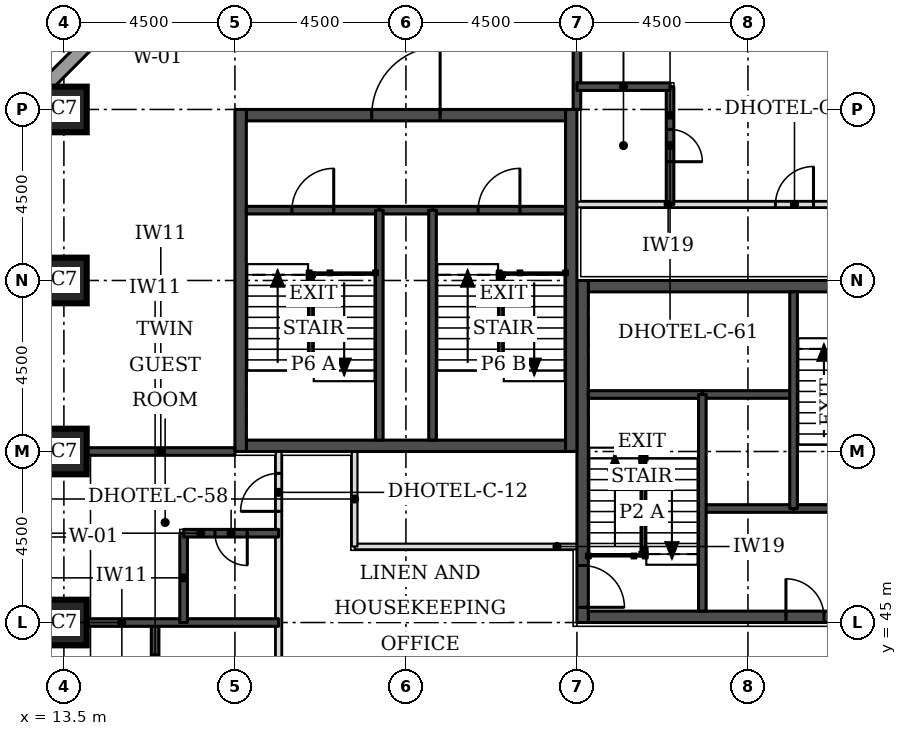
"""IFC4 building model, lengths in metres.
Left out: names, types, materials, properties, quantities, classifications, styles, units other than length and angle.
Written with IfcOpenShell. Run it as: python <this file> out.ifc"""

import sys

from ifc_helpers import new_model, si_unit, direction, frame, frame_2d, origin, origin_2d, place, context, subcontext, project, spatial, rectangle, extrude, element, fill, save


model = new_model("IFC4")
c1 = context("Model", 3, precision=1e-05, world=origin(), true_north=direction((0.0, 1.0)))
c2 = subcontext(c1, "Body", "Model", "MODEL_VIEW")
j1 = project(units=[si_unit("LENGTHUNIT", "METRE"), si_unit("PLANEANGLEUNIT", "RADIAN")], contexts=[c1])
p1 = place(None, origin())
s1 = spatial("IfcSite", under=j1, at=p1, CompositionType="ELEMENT")
p2 = place(p1, origin())
s2 = spatial("IfcBuilding", under=s1, at=p2, CompositionType="ELEMENT")
p3 = place(p2, frame((0.0, 0.0, 33.0)))
s3 = spatial("IfcBuildingStorey", under=s2, at=p3, CompositionType="ELEMENT", Elevation=33.0)
for number, where, z_axis, x_axis in (
    (1, (13.5, 45.0, 0.0), (0.0, 0.0, 1.0), (1.0, 0.0, 0.0)),
    (2, (13.5, 49.5, 0.0), (0.0, 0.0, 1.0), (1.0, 0.0, 0.0)),
    (3, (13.5, 54.0, 0.0), (0.0, 0.0, 1.0), (1.0, 0.0, 0.0)),
    (4, (13.5, 58.5, 0.0), (0.0, 0.0, 1.0), (1.0, 0.0, 0.0)),
):
    element("IfcColumn", number, at=place(p3, frame(where, z_axis=z_axis, x_axis=x_axis)), inside=s3, PredefinedType="COLUMN", context=c2, shape_type="SweptSolid", body=[
        extrude(rectangle(XDim=1.2, YDim=1.2, at=origin_2d()), origin(), (0.0, 0.0, 1.0), 3.3),
    ])
p4 = place(p3, frame((27.3, 45.15, 0.0), z_axis=(0.0, 0.0, 1.0), x_axis=(1.0, 0.0, 0.0)))
e5 = element("IfcWall", 5, at=p4, inside=s3, PredefinedType="SHEAR", context=c2, shape_type="SweptSolid", body=[
    extrude(rectangle(XDim=8.4, YDim=0.3, at=frame_2d((4.2, 0.0))), origin(), (0.0, 0.0, 1.0), 3.3),
])
p5 = place(p4, frame((5.2, 0.0, 0.0)))
e6 = element("IfcOpeningElement", 6, at=p5, cuts=e5, PredefinedType="OPENING", context=c2, shape_type="SweptSolid", body=[
    extrude(rectangle(XDim=1.0, YDim=2.1, at=frame_2d((0.5, 1.05))), frame((0.0, 0.16, 0.0), z_axis=(0.0, -1.0, 0.0), x_axis=(1.0, 0.0, 0.0)), (0.0, 0.0, 1.0), 0.32),
])
p6 = place(p3, frame((27.3, 53.85, 0.0), z_axis=(0.0, 0.0, 1.0), x_axis=(1.0, 0.0, 0.0)))
e7 = element("IfcWall", 7, at=p6, inside=s3, PredefinedType="SHEAR", context=c2, shape_type="SweptSolid", body=[
    extrude(rectangle(XDim=8.4, YDim=0.3, at=frame_2d((4.2, 0.0))), origin(), (0.0, 0.0, 1.0), 3.3),
])
p7 = place(p6, frame((6.4, 0.0, 0.0)))
e8 = element("IfcOpeningElement", 8, at=p7, cuts=e7, PredefinedType="OPENING", context=c2, shape_type="SweptSolid", body=[
    extrude(rectangle(XDim=1.1, YDim=2.1, at=frame_2d((0.55, 1.05))), frame((0.0, 0.16, 0.0), z_axis=(0.0, -1.0, 0.0), x_axis=(1.0, 0.0, 0.0)), (0.0, 0.0, 1.0), 0.32),
])
p8 = place(p3, frame((27.15, 45.0, 0.0), z_axis=(0.0, 0.0, 1.0), x_axis=(0.0, 1.0, 0.0)))
e9 = element("IfcWall", 9, at=p8, inside=s3, PredefinedType="SHEAR", context=c2, shape_type="SweptSolid", body=[
    extrude(rectangle(XDim=9.0, YDim=0.3, at=frame_2d((4.5, 0.0))), origin(), (0.0, 0.0, 1.0), 3.3),
])
p9 = place(p8, frame((0.4, 0.0, 0.0)))
e10 = element("IfcOpeningElement", 10, at=p9, cuts=e9, PredefinedType="OPENING", context=c2, shape_type="SweptSolid", body=[
    extrude(rectangle(XDim=1.1, YDim=2.1, at=frame_2d((0.55, 1.05))), frame((0.0, 0.16, 0.0), z_axis=(0.0, -1.0, 0.0), x_axis=(1.0, 0.0, 0.0)), (0.0, 0.0, 1.0), 0.32),
])
p10 = place(p3, frame((18.3, 49.65, 0.0), z_axis=(0.0, 0.0, 1.0), x_axis=(1.0, 0.0, 0.0)))
e11 = element("IfcWall", 11, at=p10, inside=s3, PredefinedType="SHEAR", context=c2, shape_type="SweptSolid", body=[
    extrude(rectangle(XDim=8.4, YDim=0.3, at=frame_2d((4.2, 0.0))), origin(), (0.0, 0.0, 1.0), 3.3),
])
p11 = place(p3, frame((18.3, 58.35, 0.0), z_axis=(0.0, 0.0, 1.0), x_axis=(1.0, 0.0, 0.0)))
e12 = element("IfcWall", 12, at=p11, inside=s3, PredefinedType="SHEAR", context=c2, shape_type="SweptSolid", body=[
    extrude(rectangle(XDim=8.4, YDim=0.3, at=frame_2d((4.2, 0.0))), origin(), (0.0, 0.0, 1.0), 3.3),
])
p12 = place(p11, frame((3.3, 0.0, 0.0)))
e13 = element("IfcOpeningElement", 13, at=p12, cuts=e12, PredefinedType="OPENING", context=c2, shape_type="SweptSolid", body=[
    extrude(rectangle(XDim=1.8, YDim=2.1, at=frame_2d((0.9, 1.05))), frame((0.0, 0.16, 0.0), z_axis=(0.0, -1.0, 0.0), x_axis=(1.0, 0.0, 0.0)), (0.0, 0.0, 1.0), 0.32),
])
for number, where, z_axis, x_axis in (
    (14, (18.15, 49.5, 0.0), (0.0, 0.0, 1.0), (0.0, 1.0, 0.0)),
    (15, (26.85, 49.5, 0.0), (0.0, 0.0, 1.0), (0.0, 1.0, 0.0)),
):
    element("IfcWall", number, at=place(p3, frame(where, z_axis=z_axis, x_axis=x_axis)), inside=s3, PredefinedType="SHEAR", context=c2, shape_type="SweptSolid", body=[
        extrude(rectangle(XDim=9.0, YDim=0.3, at=frame_2d((4.5, 0.0))), origin(), (0.0, 0.0, 1.0), 3.3),
    ])
p13 = place(p3, frame((17.73, 63.826, 0.0), z_axis=(0.0, 0.0, 1.0), x_axis=(-0.707106781187, -0.707106781187, 0.0)))
e16 = element("IfcWall", 16, at=p13, inside=s3, PredefinedType="STANDARD", context=c2, shape_type="SweptSolid", body=[
    extrude(rectangle(XDim=7.151, YDim=0.35, at=frame_2d((3.576, 0.0))), origin(), (0.0, 0.0, 1.0), 3.055),
])
p14 = place(p13, frame((1.926, 0.0, 0.8)))
e17 = element("IfcOpeningElement", 17, at=p14, cuts=e16, PredefinedType="OPENING", context=c2, shape_type="SweptSolid", body=[
    extrude(rectangle(XDim=3.3, YDim=1.5, at=frame_2d((1.65, 0.75))), frame((0.0, 0.185, 0.0), z_axis=(0.0, -1.0, 0.0), x_axis=(1.0, 0.0, 0.0)), (0.0, 0.0, 1.0), 0.37),
])
p15 = place(p3, frame((19.15, 25.15, 0.0), z_axis=(0.0, 0.0, 1.0), x_axis=(0.0, 1.0, 0.0)))
e18 = element("IfcWall", 18, at=p15, inside=s3, PredefinedType="PARTITIONING", context=c2, shape_type="SweptSolid", body=[
    extrude(rectangle(XDim=24.35, YDim=0.15, at=frame_2d((12.175, 0.0))), origin(), (0.0, 0.0, 1.0), 3.08),
])
p16 = place(p15, frame((0.347, 0.0, 0.0)))
e19 = element("IfcOpeningElement", 19, at=p16, cuts=e18, PredefinedType="OPENING", context=c2, shape_type="SweptSolid", body=[
    extrude(rectangle(XDim=1.0, YDim=2.1, at=frame_2d((0.5, 1.05))), frame((0.0, 0.085, 0.0), z_axis=(0.0, -1.0, 0.0), x_axis=(1.0, 0.0, 0.0)), (0.0, 0.0, 1.0), 0.17),
])
p17 = place(p15, frame((4.775, 0.0, 0.0)))
e20 = element("IfcOpeningElement", 20, at=p17, cuts=e18, PredefinedType="OPENING", context=c2, shape_type="SweptSolid", body=[
    extrude(rectangle(XDim=1.0, YDim=2.1, at=frame_2d((0.5, 1.05))), frame((0.0, 0.085, 0.0), z_axis=(0.0, -1.0, 0.0), x_axis=(1.0, 0.0, 0.0)), (0.0, 0.0, 1.0), 0.17),
])
p18 = place(p15, frame((7.175, 0.0, 0.0)))
e21 = element("IfcOpeningElement", 21, at=p18, cuts=e18, PredefinedType="OPENING", context=c2, shape_type="SweptSolid", body=[
    extrude(rectangle(XDim=1.0, YDim=2.1, at=frame_2d((0.5, 1.05))), frame((0.0, 0.085, 0.0), z_axis=(0.0, -1.0, 0.0), x_axis=(1.0, 0.0, 0.0)), (0.0, 0.0, 1.0), 0.17),
])
p19 = place(p15, frame((13.75, 0.0, 0.0)))
e22 = element("IfcOpeningElement", 22, at=p19, cuts=e18, PredefinedType="OPENING", context=c2, shape_type="SweptSolid", body=[
    extrude(rectangle(XDim=1.0, YDim=2.1, at=frame_2d((0.5, 1.05))), frame((0.0, 0.085, 0.0), z_axis=(0.0, -1.0, 0.0), x_axis=(1.0, 0.0, 0.0)), (0.0, 0.0, 1.0), 0.17),
])
p20 = place(p15, frame((16.175, 0.0, 0.0)))
e23 = element("IfcOpeningElement", 23, at=p20, cuts=e18, PredefinedType="OPENING", context=c2, shape_type="SweptSolid", body=[
    extrude(rectangle(XDim=1.0, YDim=2.1, at=frame_2d((0.5, 1.05))), frame((0.0, 0.085, 0.0), z_axis=(0.0, -1.0, 0.0), x_axis=(1.0, 0.0, 0.0)), (0.0, 0.0, 1.0), 0.17),
])
p21 = place(p15, frame((22.775, 0.0, 0.0)))
e24 = element("IfcOpeningElement", 24, at=p21, cuts=e18, PredefinedType="OPENING", context=c2, shape_type="SweptSolid", body=[
    extrude(rectangle(XDim=1.0, YDim=2.1, at=frame_2d((0.5, 1.05))), frame((0.0, 0.085, 0.0), z_axis=(0.0, -1.0, 0.0), x_axis=(1.0, 0.0, 0.0)), (0.0, 0.0, 1.0), 0.17),
])
p22 = place(p3, frame((21.15, 47.0, 0.0), z_axis=(0.0, 0.0, 1.0), x_axis=(1.0, 0.0, 0.0)))
e25 = element("IfcWall", 25, at=p22, inside=s3, PredefinedType="PARTITIONING", context=c2, shape_type="SweptSolid", body=[
    extrude(rectangle(XDim=5.85, YDim=0.15, at=frame_2d((2.925, 0.0))), origin(), (0.0, 0.0, 1.0), 3.08),
])
p23 = place(p3, frame((21.15, 47.0, 0.0), z_axis=(0.0, 0.0, 1.0), x_axis=(0.0, 1.0, 0.0)))
e26 = element("IfcWall", 26, at=p23, inside=s3, PredefinedType="PARTITIONING", context=c2, shape_type="SweptSolid", body=[
    extrude(rectangle(XDim=2.5, YDim=0.15, at=frame_2d((1.25, 0.0))), origin(), (0.0, 0.0, 1.0), 3.08),
])
p24 = place(p3, frame((27.0, 56.0, 0.0), z_axis=(0.0, 0.0, 1.0), x_axis=(1.0, 0.0, 0.0)))
e27 = element("IfcWall", 27, at=p24, inside=s3, PredefinedType="PARTITIONING", context=c2, shape_type="SweptSolid", body=[
    extrude(rectangle(XDim=16.0, YDim=0.15, at=frame_2d((8.0, 0.0))), origin(), (0.0, 0.0, 1.0), 3.08),
])
p25 = place(p24, frame((5.225, 0.0, 0.0)))
e28 = element("IfcOpeningElement", 28, at=p25, cuts=e27, PredefinedType="OPENING", context=c2, shape_type="SweptSolid", body=[
    extrude(rectangle(XDim=1.0, YDim=2.1, at=frame_2d((0.5, 1.05))), frame((0.0, 0.085, 0.0), z_axis=(0.0, -1.0, 0.0), x_axis=(1.0, 0.0, 0.0)), (0.0, 0.0, 1.0), 0.17),
])
p26 = place(p3, frame((15.9, 43.15, 0.0), z_axis=(0.0, 0.0, 1.0), x_axis=(0.0, 1.0, 0.0)))
e29 = element("IfcWall", 29, at=p26, inside=s3, PredefinedType="SOLIDWALL", context=c2, shape_type="SweptSolid", body=[
    extrude(rectangle(XDim=1.85, YDim=0.2, at=frame_2d((0.925, 0.0))), origin(), (0.0, 0.0, 1.0), 3.08),
])
p27 = place(p3, frame((14.1, 45.0, 0.0), z_axis=(0.0, 0.0, 1.0), x_axis=(1.0, 0.0, 0.0)))
e30 = element("IfcWall", 30, at=p27, inside=s3, PredefinedType="SOLIDWALL", context=c2, shape_type="SweptSolid", body=[
    extrude(rectangle(XDim=5.05, YDim=0.2, at=frame_2d((2.525, 0.0))), origin(), (0.0, 0.0, 1.0), 3.08),
])
p28 = place(p3, frame((16.65, 45.0, 0.0), z_axis=(0.0, 0.0, 1.0), x_axis=(0.0, 1.0, 0.0)))
e31 = element("IfcWall", 31, at=p28, inside=s3, PredefinedType="SOLIDWALL", context=c2, shape_type="SweptSolid", body=[
    extrude(rectangle(XDim=2.35, YDim=0.2, at=frame_2d((1.175, 0.0))), origin(), (0.0, 0.0, 1.0), 3.08),
])
p29 = place(p3, frame((16.65, 47.35, 0.0), z_axis=(0.0, 0.0, 1.0), x_axis=(1.0, 0.0, 0.0)))
e32 = element("IfcWall", 32, at=p29, inside=s3, PredefinedType="SOLIDWALL", context=c2, shape_type="SweptSolid", body=[
    extrude(rectangle(XDim=2.5, YDim=0.2, at=frame_2d((1.25, 0.0))), origin(), (0.0, 0.0, 1.0), 3.08),
])
p30 = place(p29, frame((0.825, 0.0, 0.0)))
e33 = element("IfcOpeningElement", 33, at=p30, cuts=e32, PredefinedType="OPENING", context=c2, shape_type="SweptSolid", body=[
    extrude(rectangle(XDim=0.85, YDim=2.1, at=frame_2d((0.425, 1.05))), frame((0.0, 0.11, 0.0), z_axis=(0.0, -1.0, 0.0), x_axis=(1.0, 0.0, 0.0)), (0.0, 0.0, 1.0), 0.22),
])
for number, where, z_axis, x_axis in (
    (34, (14.1, 49.5, 0.0), (0.0, 0.0, 1.0), (1.0, 0.0, 0.0)),
    (35, (27.0, 58.5, 0.0), (0.0, 0.0, 1.0), (0.0, 1.0, 0.0)),
):
    element("IfcWall", number, at=place(p3, frame(where, z_axis=z_axis, x_axis=x_axis)), inside=s3, PredefinedType="SOLIDWALL", context=c2, shape_type="SweptSolid", body=[
        extrude(rectangle(XDim=3.9, YDim=0.2, at=frame_2d((1.95, 0.0))), origin(), (0.0, 0.0, 1.0), 3.08),
    ])
p31 = place(p3, frame((29.45, 56.0, 0.0), z_axis=(0.0, 0.0, 1.0), x_axis=(0.0, 1.0, 0.0)))
e36 = element("IfcWall", 36, at=p31, inside=s3, PredefinedType="SOLIDWALL", context=c2, shape_type="SweptSolid", body=[
    extrude(rectangle(XDim=3.1, YDim=0.2, at=frame_2d((1.55, 0.0))), origin(), (0.0, 0.0, 1.0), 3.08),
])
p32 = place(p31, frame((1.125, 0.0, 0.0)))
e37 = element("IfcOpeningElement", 37, at=p32, cuts=e36, PredefinedType="OPENING", context=c2, shape_type="SweptSolid", body=[
    extrude(rectangle(XDim=0.85, YDim=2.1, at=frame_2d((0.425, 1.05))), frame((0.0, 0.11, 0.0), z_axis=(0.0, -1.0, 0.0), x_axis=(1.0, 0.0, 0.0)), (0.0, 0.0, 1.0), 0.22),
])
p33 = place(p3, frame((27.0, 59.1, 0.0), z_axis=(0.0, 0.0, 1.0), x_axis=(1.0, 0.0, 0.0)))
e38 = element("IfcWall", 38, at=p33, inside=s3, PredefinedType="SOLIDWALL", context=c2, shape_type="SweptSolid", body=[
    extrude(rectangle(XDim=2.45, YDim=0.2, at=frame_2d((1.225, 0.0))), origin(), (0.0, 0.0, 1.0), 3.08),
])
p34 = place(p3, frame((30.3, 48.0, 0.0), z_axis=(0.0, 0.0, 1.0), x_axis=(1.0, 0.0, 0.0)))
e39 = element("IfcWall", 39, at=p34, inside=s3, PredefinedType="SOLIDWALL", context=c2, shape_type="SweptSolid", body=[
    extrude(rectangle(XDim=2.4, YDim=0.2, at=frame_2d((1.2, 0.0))), origin(), (0.0, 0.0, 1.0), 3.08),
])
p35 = place(p3, frame((32.7, 48.0, 0.0), z_axis=(0.0, 0.0, 1.0), x_axis=(1.0, 0.0, 0.0)))
e40 = element("IfcWall", 40, at=p35, inside=s3, PredefinedType="SOLIDWALL", context=c2, shape_type="SweptSolid", body=[
    extrude(rectangle(XDim=3.0, YDim=0.2, at=frame_2d((1.5, 0.0))), origin(), (0.0, 0.0, 1.0), 3.08),
])
p36 = place(p3, frame((30.3, 51.0, 0.0), z_axis=(0.0, 0.0, 1.0), x_axis=(1.0, 0.0, 0.0)))
e41 = element("IfcWall", 41, at=p36, inside=s3, PredefinedType="SOLIDWALL", context=c2, shape_type="SweptSolid", body=[
    extrude(rectangle(XDim=2.4, YDim=0.2, at=frame_2d((1.2, 0.0))), origin(), (0.0, 0.0, 1.0), 3.3),
])
p37 = place(p3, frame((27.3, 51.0, 0.0), z_axis=(0.0, 0.0, 1.0), x_axis=(1.0, 0.0, 0.0)))
e42 = element("IfcWall", 42, at=p37, inside=s3, PredefinedType="SOLIDWALL", context=c2, shape_type="SweptSolid", body=[
    extrude(rectangle(XDim=3.0, YDim=0.2, at=frame_2d((1.5, 0.0))), origin(), (0.0, 0.0, 1.0), 3.08),
])
for number, where, z_axis, x_axis in (
    (43, (30.3, 45.3, 0.0), (0.0, 0.0, 1.0), (0.0, 1.0, 0.0)),
    (44, (32.7, 48.0, 0.0), (0.0, 0.0, 1.0), (0.0, 1.0, 0.0)),
):
    element("IfcWall", number, at=place(p3, frame(where, z_axis=z_axis, x_axis=x_axis)), inside=s3, PredefinedType="SOLIDWALL", context=c2, shape_type="SweptSolid", body=[
        extrude(rectangle(XDim=5.7, YDim=0.2, at=frame_2d((2.85, 0.0))), origin(), (0.0, 0.0, 1.0), 3.08),
    ])
p38 = place(p3, frame((21.8, 55.85, 0.0), z_axis=(0.0, 0.0, 1.0), x_axis=(1.0, 0.0, 0.0)))
e45 = element("IfcWall", 45, at=p38, inside=s3, PredefinedType="SOLIDWALL", context=c2, shape_type="SweptSolid", body=[
    extrude(rectangle(XDim=1.4, YDim=0.2, at=frame_2d((0.7, 0.0))), origin(), (0.0, 0.0, 1.0), 3.08),
])
p39 = place(p3, frame((18.3, 55.85, 0.0), z_axis=(0.0, 0.0, 1.0), x_axis=(1.0, 0.0, 0.0)))
e46 = element("IfcWall", 46, at=p39, inside=s3, PredefinedType="SOLIDWALL", context=c2, shape_type="SweptSolid", body=[
    extrude(rectangle(XDim=3.5, YDim=0.2, at=frame_2d((1.75, 0.0))), origin(), (0.0, 0.0, 1.0), 3.08),
])
p40 = place(p39, frame((1.2, 0.0, 0.0)))
e47 = element("IfcOpeningElement", 47, at=p40, cuts=e46, PredefinedType="OPENING", context=c2, shape_type="SweptSolid", body=[
    extrude(rectangle(XDim=1.1, YDim=2.1, at=frame_2d((0.55, 1.05))), frame((0.0, 0.11, 0.0), z_axis=(0.0, -1.0, 0.0), x_axis=(1.0, 0.0, 0.0)), (0.0, 0.0, 1.0), 0.22),
])
p41 = place(p3, frame((23.2, 55.85, 0.0), z_axis=(0.0, 0.0, 1.0), x_axis=(1.0, 0.0, 0.0)))
e48 = element("IfcWall", 48, at=p41, inside=s3, PredefinedType="SOLIDWALL", context=c2, shape_type="SweptSolid", body=[
    extrude(rectangle(XDim=3.5, YDim=0.2, at=frame_2d((1.75, 0.0))), origin(), (0.0, 0.0, 1.0), 3.08),
])
p42 = place(p41, frame((1.2, 0.0, 0.0)))
e49 = element("IfcOpeningElement", 49, at=p42, cuts=e48, PredefinedType="OPENING", context=c2, shape_type="SweptSolid", body=[
    extrude(rectangle(XDim=1.1, YDim=2.1, at=frame_2d((0.55, 1.05))), frame((0.0, 0.11, 0.0), z_axis=(0.0, -1.0, 0.0), x_axis=(1.0, 0.0, 0.0)), (0.0, 0.0, 1.0), 0.22),
])
for number, where, z_axis, x_axis in (
    (50, (21.8, 49.8, 0.0), (0.0, 0.0, 1.0), (0.0, 1.0, 0.0)),
    (51, (23.2, 49.8, 0.0), (0.0, 0.0, 1.0), (0.0, 1.0, 0.0)),
):
    element("IfcWall", number, at=place(p3, frame(where, z_axis=z_axis, x_axis=x_axis)), inside=s3, PredefinedType="SOLIDWALL", context=c2, shape_type="SweptSolid", body=[
        extrude(rectangle(XDim=6.05, YDim=0.2, at=frame_2d((3.025, 0.0))), origin(), (0.0, 0.0, 1.0), 3.08),
    ])
p43 = place(p21, origin())
e52 = element("IfcDoor", 52, at=p43, inside=s3, OperationType="SINGLE_SWING_LEFT", PredefinedType="DOOR", context=c2, shape_type="SweptSolid", body=[
    extrude(rectangle(XDim=1.0, YDim=2.1, at=frame_2d((0.5, 1.05))), frame((0.0, 0.025, 0.0), z_axis=(0.0, -1.0, 0.0), x_axis=(1.0, 0.0, 0.0)), (0.0, 0.0, 1.0), 0.05),
])
fill(e24, e52)
p44 = place(p30, frame((0.85, 0.0, 0.0), z_axis=(0.0, 0.0, 1.0), x_axis=(-1.0, 0.0, 0.0)))
e53 = element("IfcDoor", 53, at=p44, inside=s3, OperationType="SINGLE_SWING_LEFT", PredefinedType="DOOR", context=c2, shape_type="SweptSolid", body=[
    extrude(rectangle(XDim=0.85, YDim=2.1, at=frame_2d((0.425, 1.05))), frame((0.0, 0.025, 0.0), z_axis=(0.0, -1.0, 0.0), x_axis=(1.0, 0.0, 0.0)), (0.0, 0.0, 1.0), 0.05),
])
fill(e33, e53)
p45 = place(p25, origin())
e54 = element("IfcDoor", 54, at=p45, inside=s3, OperationType="SINGLE_SWING_RIGHT", PredefinedType="DOOR", context=c2, shape_type="SweptSolid", body=[
    extrude(rectangle(XDim=1.0, YDim=2.1, at=frame_2d((0.5, 1.05))), frame((0.0, 0.025, 0.0), z_axis=(0.0, -1.0, 0.0), x_axis=(1.0, 0.0, 0.0)), (0.0, 0.0, 1.0), 0.05),
])
fill(e28, e54)
p46 = place(p32, frame((0.85, 0.0, 0.0), z_axis=(0.0, 0.0, 1.0), x_axis=(-1.0, 0.0, 0.0)))
e55 = element("IfcDoor", 55, at=p46, inside=s3, OperationType="SINGLE_SWING_RIGHT", PredefinedType="DOOR", context=c2, shape_type="SweptSolid", body=[
    extrude(rectangle(XDim=0.85, YDim=2.1, at=frame_2d((0.425, 1.05))), frame((0.0, 0.025, 0.0), z_axis=(0.0, -1.0, 0.0), x_axis=(1.0, 0.0, 0.0)), (0.0, 0.0, 1.0), 0.05),
])
fill(e37, e55)
p47 = place(p9, frame((1.1, 0.0, 0.0), z_axis=(0.0, 0.0, 1.0), x_axis=(-1.0, 0.0, 0.0)))
e56 = element("IfcDoor", 56, at=p47, inside=s3, OperationType="SINGLE_SWING_RIGHT", PredefinedType="DOOR", context=c2, shape_type="SweptSolid", body=[
    extrude(rectangle(XDim=1.1, YDim=2.1, at=frame_2d((0.55, 1.05))), frame((0.0, 0.025, 0.0), z_axis=(0.0, -1.0, 0.0), x_axis=(1.0, 0.0, 0.0)), (0.0, 0.0, 1.0), 0.05),
])
fill(e10, e56)
p48 = place(p5, origin())
e57 = element("IfcDoor", 57, at=p48, inside=s3, OperationType="SINGLE_SWING_LEFT", PredefinedType="DOOR", context=c2, shape_type="SweptSolid", body=[
    extrude(rectangle(XDim=1.0, YDim=2.1, at=frame_2d((0.5, 1.05))), frame((0.0, 0.025, 0.0), z_axis=(0.0, -1.0, 0.0), x_axis=(1.0, 0.0, 0.0)), (0.0, 0.0, 1.0), 0.05),
])
fill(e6, e57)
p49 = place(p40, origin())
e58 = element("IfcDoor", 58, at=p49, inside=s3, OperationType="SINGLE_SWING_RIGHT", PredefinedType="DOOR", context=c2, shape_type="SweptSolid", body=[
    extrude(rectangle(XDim=1.1, YDim=2.1, at=frame_2d((0.55, 1.05))), frame((0.0, 0.025, 0.0), z_axis=(0.0, -1.0, 0.0), x_axis=(1.0, 0.0, 0.0)), (0.0, 0.0, 1.0), 0.05),
])
fill(e47, e58)
p50 = place(p42, origin())
e59 = element("IfcDoor", 59, at=p50, inside=s3, OperationType="SINGLE_SWING_RIGHT", PredefinedType="DOOR", context=c2, shape_type="SweptSolid", body=[
    extrude(rectangle(XDim=1.1, YDim=2.1, at=frame_2d((0.55, 1.05))), frame((0.0, 0.025, 0.0), z_axis=(0.0, -1.0, 0.0), x_axis=(1.0, 0.0, 0.0)), (0.0, 0.0, 1.0), 0.05),
])
fill(e49, e59)
p51 = place(p12, origin())
e60 = element("IfcDoor", 60, at=p51, inside=s3, OperationType="SINGLE_SWING_RIGHT", PredefinedType="DOOR", context=c2, shape_type="SweptSolid", body=[
    extrude(rectangle(XDim=1.8, YDim=2.1, at=frame_2d((0.9, 1.05))), frame((0.0, 0.025, 0.0), z_axis=(0.0, -1.0, 0.0), x_axis=(1.0, 0.0, 0.0)), (0.0, 0.0, 1.0), 0.05),
])
fill(e13, e60)
save(model, sys.argv[1])
